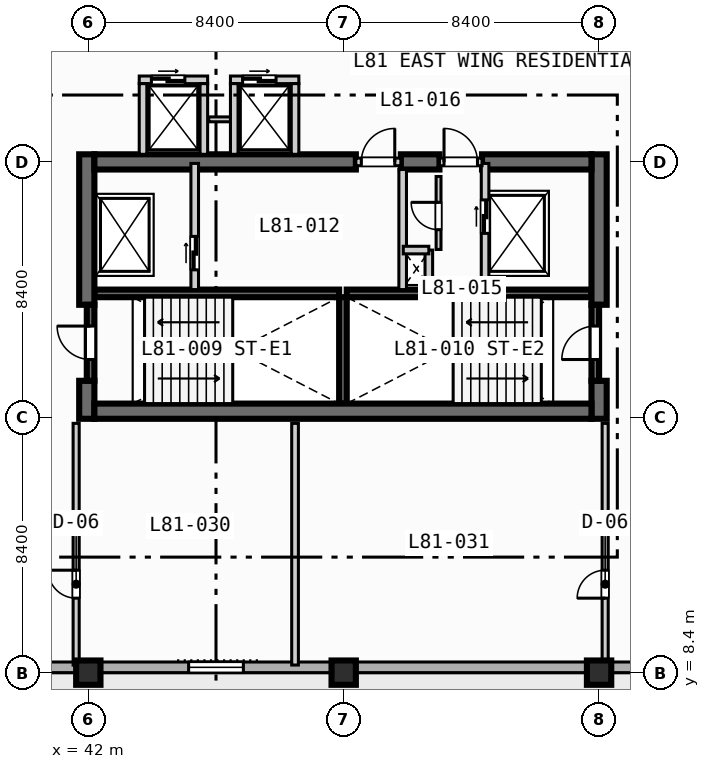
"""IFC4 building model, lengths in metres.
Left out: names, types, materials, properties, quantities, classifications, styles, units other than length and angle.
Written with IfcOpenShell. Run it as: python <this file> out.ifc"""

import sys

from ifc_helpers import new_model, si_unit, direction, frame, frame_2d, origin, origin_2d, place, context, subcontext, project, spatial, rectangle, extrude, element, fill, save


model = new_model("IFC4")
c1 = context("Model", 3, precision=1e-05, world=origin(), true_north=direction((0.0, 1.0)))
c2 = subcontext(c1, "Body", "Model", "MODEL_VIEW")
j1 = project(units=[si_unit("LENGTHUNIT", "METRE"), si_unit("PLANEANGLEUNIT", "RADIAN")], contexts=[c1])
p1 = place(None, origin())
s1 = spatial("IfcSite", under=j1, at=p1, CompositionType="ELEMENT")
p2 = place(p1, origin())
s2 = spatial("IfcBuilding", under=s1, at=p2, CompositionType="ELEMENT")
p3 = place(p2, frame((0.0, 0.0, 328.1)))
s3 = spatial("IfcBuildingStorey", under=s2, at=p3, CompositionType="ELEMENT", Elevation=328.1)
for number, where, z_axis, x_axis in (
    (1, (42.2, 20.875, 0.0), (0.0, 0.0, 1.0), (1.0, 0.0, 0.0)),
    (2, (50.5, 20.875, 0.0), (0.0, 0.0, 1.0), (1.0, 0.0, 0.0)),
):
    element("IfcWall", number, at=place(p3, frame(where, z_axis=z_axis, x_axis=x_axis)), inside=s3, PredefinedType="SOLIDWALL", context=c2, shape_type="SweptSolid", body=[
        extrude(rectangle(XDim=8.05, YDim=0.25, at=frame_2d((4.025, 0.0))), origin(), (0.0, 0.0, 1.0), 3.67),
    ])
p4 = place(p3, frame((50.375, 17.25, 0.0), z_axis=(0.0, 0.0, 1.0), x_axis=(0.0, 1.0, 0.0)))
e3 = element("IfcWall", 3, at=p4, inside=s3, PredefinedType="SOLIDWALL", context=c2, shape_type="SweptSolid", body=[
    extrude(rectangle(XDim=3.5, YDim=0.25, at=frame_2d((1.75, 0.0))), origin(), (0.0, 0.0, 1.0), 3.67),
])
p5 = place(p3, frame((41.95, 16.75, 0.0), z_axis=(0.0, 0.0, 1.0), x_axis=(0.0, 1.0, 0.0)))
e4 = element("IfcWall", 4, at=p5, inside=s3, PredefinedType="SHEAR", context=c2, shape_type="SweptSolid", body=[
    extrude(rectangle(XDim=1.25, YDim=0.5, at=frame_2d((0.625, 0.0))), origin(), (0.0, 0.0, 1.0), 3.67),
])
p6 = place(p3, frame((41.95, 20.5, 0.0), z_axis=(0.0, 0.0, 1.0), x_axis=(0.0, 1.0, 0.0)))
e5 = element("IfcWall", 5, at=p6, inside=s3, PredefinedType="SHEAR", context=c2, shape_type="SweptSolid", body=[
    extrude(rectangle(XDim=4.95, YDim=0.5, at=frame_2d((2.475, 0.0))), origin(), (0.0, 0.0, 1.0), 3.67),
])
p7 = place(p3, frame((58.8, 16.75, 0.0), z_axis=(0.0, 0.0, 1.0), x_axis=(0.0, 1.0, 0.0)))
e6 = element("IfcWall", 6, at=p7, inside=s3, PredefinedType="SHEAR", context=c2, shape_type="SweptSolid", body=[
    extrude(rectangle(XDim=1.25, YDim=0.5, at=frame_2d((0.625, 0.0))), origin(), (0.0, 0.0, 1.0), 3.67),
])
p8 = place(p3, frame((58.8, 20.5, 0.0), z_axis=(0.0, 0.0, 1.0), x_axis=(0.0, 1.0, 0.0)))
e7 = element("IfcWall", 7, at=p8, inside=s3, PredefinedType="SHEAR", context=c2, shape_type="SweptSolid", body=[
    extrude(rectangle(XDim=4.95, YDim=0.5, at=frame_2d((2.475, 0.0))), origin(), (0.0, 0.0, 1.0), 3.67),
])
p9 = place(p3, frame((42.2, 17.0, 0.0), z_axis=(0.0, 0.0, 1.0), x_axis=(1.0, 0.0, 0.0)))
e8 = element("IfcWall", 8, at=p9, inside=s3, PredefinedType="SHEAR", context=c2, shape_type="SweptSolid", body=[
    extrude(rectangle(XDim=16.35, YDim=0.5, at=frame_2d((8.175, 0.0))), origin(), (0.0, 0.0, 1.0), 3.67),
])
p10 = place(p3, frame((42.2, 25.2, 0.0), z_axis=(0.0, 0.0, 1.0), x_axis=(1.0, 0.0, 0.0)))
e9 = element("IfcWall", 9, at=p10, inside=s3, PredefinedType="SHEAR", context=c2, shape_type="SweptSolid", body=[
    extrude(rectangle(XDim=8.6, YDim=0.5, at=frame_2d((4.3, 0.0))), origin(), (0.0, 0.0, 1.0), 3.67),
])
p11 = place(p3, frame((52.28, 25.2, 0.0), z_axis=(0.0, 0.0, 1.0), x_axis=(1.0, 0.0, 0.0)))
e10 = element("IfcWall", 10, at=p11, inside=s3, PredefinedType="SHEAR", context=c2, shape_type="SweptSolid", body=[
    extrude(rectangle(XDim=1.27, YDim=0.5, at=frame_2d((0.635, 0.0))), origin(), (0.0, 0.0, 1.0), 3.67),
])
p12 = place(p3, frame((54.95, 25.2, 0.0), z_axis=(0.0, 0.0, 1.0), x_axis=(1.0, 0.0, 0.0)))
e11 = element("IfcWall", 11, at=p12, inside=s3, PredefinedType="SHEAR", context=c2, shape_type="SweptSolid", body=[
    extrude(rectangle(XDim=3.6, YDim=0.5, at=frame_2d((1.8, 0.0))), origin(), (0.0, 0.0, 1.0), 3.67),
])
for number, where, z_axis, x_axis in (
    (12, (42.0, 8.4, 0.0), (0.0, 0.0, 1.0), (1.0, 0.0, 0.0)),
    (13, (50.4, 8.4, 0.0), (0.0, 0.0, 1.0), (1.0, 0.0, 0.0)),
    (14, (58.8, 8.4, 0.0), (0.0, 0.0, 1.0), (1.0, 0.0, 0.0)),
):
    element("IfcColumn", number, at=place(p3, frame(where, z_axis=z_axis, x_axis=x_axis)), inside=s3, PredefinedType="COLUMN", context=c2, shape_type="SweptSolid", body=[
        extrude(rectangle(XDim=0.8, YDim=0.8, at=origin_2d()), origin(), (0.0, 0.0, 1.0), 3.9),
    ])
p13 = place(p3, frame((64.025, 8.575, 0.0), z_axis=(0.0, 0.0, 1.0), x_axis=(-1.0, 0.0, 0.0)))
e15 = element("IfcWall", 15, at=p13, inside=s3, PredefinedType="STANDARD", context=c2, shape_type="SweptSolid", body=[
    extrude(rectangle(XDim=52.45, YDim=0.35, at=frame_2d((26.225, 0.0))), origin(), (0.0, 0.0, 1.0), 3.67),
])
p14 = place(p13, frame((32.925, 0.0, 0.0)))
e16 = element("IfcOpeningElement", 16, at=p14, cuts=e15, PredefinedType="OPENING", context=c2, shape_type="SweptSolid", body=[
    extrude(rectangle(XDim=1.4, YDim=2.2, at=frame_2d((0.7, 1.1))), frame((0.0, 0.185, 0.0), z_axis=(0.0, -1.0, 0.0), x_axis=(1.0, 0.0, 0.0)), (0.0, 0.0, 1.0), 0.37),
])
p15 = place(p13, frame((41.825, 0.0, 0.85)))
e17 = element("IfcOpeningElement", 17, at=p15, cuts=e15, PredefinedType="OPENING", context=c2, shape_type="SweptSolid", body=[
    extrude(rectangle(XDim=2.4, YDim=1.95, at=frame_2d((1.2, 0.975))), frame((0.0, 0.185, 0.0), z_axis=(0.0, -1.0, 0.0), x_axis=(1.0, 0.0, 0.0)), (0.0, 0.0, 1.0), 0.37),
])
p16 = place(p13, frame((25.025, 0.0, 0.85)))
e18 = element("IfcOpeningElement", 18, at=p16, cuts=e15, PredefinedType="OPENING", context=c2, shape_type="SweptSolid", body=[
    extrude(rectangle(XDim=2.4, YDim=1.95, at=frame_2d((1.2, 0.975))), frame((0.0, 0.185, 0.0), z_axis=(0.0, -1.0, 0.0), x_axis=(1.0, 0.0, 0.0)), (0.0, 0.0, 1.0), 0.37),
])
p17 = place(p13, frame((16.925, 0.0, 0.85)))
e19 = element("IfcOpeningElement", 19, at=p17, cuts=e15, PredefinedType="OPENING", context=c2, shape_type="SweptSolid", body=[
    extrude(rectangle(XDim=1.8, YDim=1.8, at=frame_2d((0.9, 0.9))), frame((0.0, 0.185, 0.0), z_axis=(0.0, -1.0, 0.0), x_axis=(1.0, 0.0, 0.0)), (0.0, 0.0, 1.0), 0.37),
])
p18 = place(p13, frame((49.75, 0.0, 0.85)))
e20 = element("IfcOpeningElement", 20, at=p18, cuts=e15, PredefinedType="OPENING", context=c2, shape_type="SweptSolid", body=[
    extrude(rectangle(XDim=1.8, YDim=1.8, at=frame_2d((0.9, 0.9))), frame((0.0, 0.185, 0.0), z_axis=(0.0, -1.0, 0.0), x_axis=(1.0, 0.0, 0.0)), (0.0, 0.0, 1.0), 0.37),
])
p19 = place(p13, frame((47.89, 0.0, 0.85)))
e21 = element("IfcOpeningElement", 21, at=p19, cuts=e15, PredefinedType="OPENING", context=c2, shape_type="SweptSolid", body=[
    extrude(rectangle(XDim=0.72, YDim=1.8, at=frame_2d((0.36, 0.9))), frame((0.0, 0.185, 0.0), z_axis=(0.0, -1.0, 0.0), x_axis=(1.0, 0.0, 0.0)), (0.0, 0.0, 1.0), 0.37),
])
p20 = place(p13, frame((35.75, 0.0, 0.85)))
e22 = element("IfcOpeningElement", 22, at=p20, cuts=e15, PredefinedType="OPENING", context=c2, shape_type="SweptSolid", body=[
    extrude(rectangle(XDim=1.8, YDim=1.8, at=frame_2d((0.9, 0.9))), frame((0.0, 0.185, 0.0), z_axis=(0.0, -1.0, 0.0), x_axis=(1.0, 0.0, 0.0)), (0.0, 0.0, 1.0), 0.37),
])
p21 = place(p3, frame((42.075, 18.0, 0.0), z_axis=(0.0, 0.0, 1.0), x_axis=(0.0, 1.0, 0.0)))
e23 = element("IfcWall", 23, at=p21, inside=s3, PredefinedType="SOLIDWALL", context=c2, shape_type="SweptSolid", body=[
    extrude(rectangle(XDim=2.5, YDim=0.25, at=frame_2d((1.25, 0.0))), origin(), (0.0, 0.0, 1.0), 3.67),
])
p22 = place(p21, frame((0.7, 0.0, 0.0)))
e24 = element("IfcOpeningElement", 24, at=p22, cuts=e23, PredefinedType="OPENING", context=c2, shape_type="SweptSolid", body=[
    extrude(rectangle(XDim=1.1, YDim=2.15, at=frame_2d((0.55, 1.075))), frame((0.0, 0.135, 0.0), z_axis=(0.0, -1.0, 0.0), x_axis=(1.0, 0.0, 0.0)), (0.0, 0.0, 1.0), 0.27),
])
p23 = place(p3, frame((58.675, 18.0, 0.0), z_axis=(0.0, 0.0, 1.0), x_axis=(0.0, 1.0, 0.0)))
e25 = element("IfcWall", 25, at=p23, inside=s3, PredefinedType="SOLIDWALL", context=c2, shape_type="SweptSolid", body=[
    extrude(rectangle(XDim=2.5, YDim=0.25, at=frame_2d((1.25, 0.0))), origin(), (0.0, 0.0, 1.0), 3.67),
])
p24 = place(p23, frame((0.7, 0.0, 0.0)))
e26 = element("IfcOpeningElement", 26, at=p24, cuts=e25, PredefinedType="OPENING", context=c2, shape_type="SweptSolid", body=[
    extrude(rectangle(XDim=1.1, YDim=2.15, at=frame_2d((0.55, 1.075))), frame((0.0, 0.135, 0.0), z_axis=(0.0, -1.0, 0.0), x_axis=(1.0, 0.0, 0.0)), (0.0, 0.0, 1.0), 0.27),
])
p25 = place(p3, frame((45.5, 21.0, 0.0), z_axis=(0.0, 0.0, 1.0), x_axis=(0.0, 1.0, 0.0)))
e27 = element("IfcWall", 27, at=p25, inside=s3, PredefinedType="SOLIDWALL", context=c2, shape_type="SweptSolid", body=[
    extrude(rectangle(XDim=4.15, YDim=0.25, at=frame_2d((2.075, 0.0))), origin(), (0.0, 0.0, 1.0), 3.67),
])
p26 = place(p25, frame((0.65, 0.0, 0.0)))
e28 = element("IfcOpeningElement", 28, at=p26, cuts=e27, PredefinedType="OPENING", context=c2, shape_type="SweptSolid", body=[
    extrude(rectangle(XDim=1.1, YDim=2.15, at=frame_2d((0.55, 1.075))), frame((0.0, 0.135, 0.0), z_axis=(0.0, -1.0, 0.0), x_axis=(1.0, 0.0, 0.0)), (0.0, 0.0, 1.0), 0.27),
])
p27 = place(p3, frame((50.8, 25.2, 0.0), z_axis=(0.0, 0.0, 1.0), x_axis=(1.0, 0.0, 0.0)))
e29 = element("IfcWall", 29, at=p27, inside=s3, PredefinedType="SOLIDWALL", context=c2, shape_type="SweptSolid", body=[
    extrude(rectangle(XDim=1.48, YDim=0.25, at=frame_2d((0.74, 0.0))), origin(), (0.0, 0.0, 1.0), 3.67),
])
p28 = place(p27, frame((0.18, 0.0, 0.0)))
e30 = element("IfcOpeningElement", 30, at=p28, cuts=e29, PredefinedType="OPENING", context=c2, shape_type="SweptSolid", body=[
    extrude(rectangle(XDim=1.1, YDim=2.15, at=frame_2d((0.55, 1.075))), frame((0.0, 0.135, 0.0), z_axis=(0.0, -1.0, 0.0), x_axis=(1.0, 0.0, 0.0)), (0.0, 0.0, 1.0), 0.27),
])
p29 = place(p3, frame((52.34, 21.0, 0.0), z_axis=(0.0, 0.0, 1.0), x_axis=(0.0, 1.0, 0.0)))
e31 = element("IfcWall", 31, at=p29, inside=s3, PredefinedType="SOLIDWALL", context=c2, shape_type="SweptSolid", body=[
    extrude(rectangle(XDim=3.95, YDim=0.25, at=frame_2d((1.975, 0.0))), origin(), (0.0, 0.0, 1.0), 3.67),
])
p30 = place(p3, frame((55.05, 21.0, 0.0), z_axis=(0.0, 0.0, 1.0), x_axis=(0.0, 1.0, 0.0)))
e32 = element("IfcWall", 32, at=p30, inside=s3, PredefinedType="SOLIDWALL", context=c2, shape_type="SweptSolid", body=[
    extrude(rectangle(XDim=4.15, YDim=0.25, at=frame_2d((2.075, 0.0))), origin(), (0.0, 0.0, 1.0), 3.67),
])
p31 = place(p30, frame((1.85, 0.0, 0.0)))
e33 = element("IfcOpeningElement", 33, at=p31, cuts=e32, PredefinedType="OPENING", context=c2, shape_type="SweptSolid", body=[
    extrude(rectangle(XDim=1.1, YDim=2.15, at=frame_2d((0.55, 1.075))), frame((0.0, 0.135, 0.0), z_axis=(0.0, -1.0, 0.0), x_axis=(1.0, 0.0, 0.0)), (0.0, 0.0, 1.0), 0.27),
])
p32 = place(p3, frame((53.55, 25.2, 0.0), z_axis=(0.0, 0.0, 1.0), x_axis=(1.0, 0.0, 0.0)))
e34 = element("IfcWall", 34, at=p32, inside=s3, PredefinedType="SOLIDWALL", context=c2, shape_type="SweptSolid", body=[
    extrude(rectangle(XDim=1.4, YDim=0.25, at=frame_2d((0.7, 0.0))), origin(), (0.0, 0.0, 1.0), 3.67),
])
p33 = place(p32, frame((0.15, 0.0, 0.0)))
e35 = element("IfcOpeningElement", 35, at=p33, cuts=e34, PredefinedType="OPENING", context=c2, shape_type="SweptSolid", body=[
    extrude(rectangle(XDim=1.1, YDim=2.15, at=frame_2d((0.55, 1.075))), frame((0.0, 0.135, 0.0), z_axis=(0.0, -1.0, 0.0), x_axis=(1.0, 0.0, 0.0)), (0.0, 0.0, 1.0), 0.27),
])
p34 = place(p3, frame((53.2, 21.0, 0.0), z_axis=(0.0, 0.0, 1.0), x_axis=(0.0, 1.0, 0.0)))
e36 = element("IfcWall", 36, at=p34, inside=s3, PredefinedType="SOLIDWALL", context=c2, shape_type="SweptSolid", body=[
    extrude(rectangle(XDim=1.3, YDim=0.25, at=frame_2d((0.65, 0.0))), origin(), (0.0, 0.0, 1.0), 3.67),
])
p35 = place(p3, frame((52.36, 22.3, 0.0), z_axis=(0.0, 0.0, 1.0), x_axis=(1.0, 0.0, 0.0)))
e37 = element("IfcWall", 37, at=p35, inside=s3, PredefinedType="SOLIDWALL", context=c2, shape_type="SweptSolid", body=[
    extrude(rectangle(XDim=0.84, YDim=0.25, at=frame_2d((0.42, 0.0))), origin(), (0.0, 0.0, 1.0), 3.67),
])
p36 = place(p3, frame((53.52, 22.32, 0.0), z_axis=(0.0, 0.0, 1.0), x_axis=(0.0, 1.0, 0.0)))
e38 = element("IfcWall", 38, at=p36, inside=s3, PredefinedType="PARTITIONING", context=c2, shape_type="SweptSolid", body=[
    extrude(rectangle(XDim=2.4, YDim=0.16, at=frame_2d((1.2, 0.0))), origin(), (0.0, 0.0, 1.0), 3.67),
])
p37 = place(p36, frame((0.65, 0.0, 0.0)))
e39 = element("IfcOpeningElement", 39, at=p37, cuts=e38, PredefinedType="OPENING", context=c2, shape_type="SweptSolid", body=[
    extrude(rectangle(XDim=0.9, YDim=2.1, at=frame_2d((0.45, 1.05))), frame((0.0, 0.09, 0.0), z_axis=(0.0, -1.0, 0.0), x_axis=(1.0, 0.0, 0.0)), (0.0, 0.0, 1.0), 0.18),
])
p38 = place(p3, frame((43.675, 27.9, 0.0), z_axis=(0.0, 0.0, 1.0), x_axis=(1.0, 0.0, 0.0)))
e40 = element("IfcWall", 40, at=p38, inside=s3, PredefinedType="SOLIDWALL", context=c2, shape_type="SweptSolid", body=[
    extrude(rectangle(XDim=2.25, YDim=0.25, at=frame_2d((1.125, 0.0))), origin(), (0.0, 0.0, 1.0), 3.67),
])
p39 = place(p38, frame((0.4, 0.0, 0.0)))
e41 = element("IfcOpeningElement", 41, at=p39, cuts=e40, PredefinedType="OPENING", context=c2, shape_type="SweptSolid", body=[
    extrude(rectangle(XDim=1.1, YDim=2.15, at=frame_2d((0.55, 1.075))), frame((0.0, 0.135, 0.0), z_axis=(0.0, -1.0, 0.0), x_axis=(1.0, 0.0, 0.0)), (0.0, 0.0, 1.0), 0.27),
])
for number, where, z_axis, x_axis in (
    (42, (43.8, 25.45, 0.0), (0.0, 0.0, 1.0), (0.0, 1.0, 0.0)),
    (43, (45.8, 25.45, 0.0), (0.0, 0.0, 1.0), (0.0, 1.0, 0.0)),
):
    element("IfcWall", number, at=place(p3, frame(where, z_axis=z_axis, x_axis=x_axis)), inside=s3, PredefinedType="SOLIDWALL", context=c2, shape_type="SweptSolid", body=[
        extrude(rectangle(XDim=2.325, YDim=0.25, at=frame_2d((1.163, 0.0))), origin(), (0.0, 0.0, 1.0), 3.67),
    ])
p40 = place(p3, frame((45.96, 26.6, 0.0), z_axis=(0.0, 0.0, 1.0), x_axis=(1.0, 0.0, 0.0)))
e44 = element("IfcWall", 44, at=p40, inside=s3, PredefinedType="PARTITIONING", context=c2, shape_type="SweptSolid", body=[
    extrude(rectangle(XDim=0.88, YDim=0.16, at=frame_2d((0.44, 0.0))), origin(), (0.0, 0.0, 1.0), 3.67),
])
p41 = place(p3, frame((46.675, 27.9, 0.0), z_axis=(0.0, 0.0, 1.0), x_axis=(1.0, 0.0, 0.0)))
e45 = element("IfcWall", 45, at=p41, inside=s3, PredefinedType="SOLIDWALL", context=c2, shape_type="SweptSolid", body=[
    extrude(rectangle(XDim=2.25, YDim=0.25, at=frame_2d((1.125, 0.0))), origin(), (0.0, 0.0, 1.0), 3.67),
])
p42 = place(p41, frame((0.4, 0.0, 0.0)))
e46 = element("IfcOpeningElement", 46, at=p42, cuts=e45, PredefinedType="OPENING", context=c2, shape_type="SweptSolid", body=[
    extrude(rectangle(XDim=1.1, YDim=2.15, at=frame_2d((0.55, 1.075))), frame((0.0, 0.135, 0.0), z_axis=(0.0, -1.0, 0.0), x_axis=(1.0, 0.0, 0.0)), (0.0, 0.0, 1.0), 0.27),
])
for number, where, z_axis, x_axis in (
    (47, (46.8, 25.45, 0.0), (0.0, 0.0, 1.0), (0.0, 1.0, 0.0)),
    (48, (48.8, 25.45, 0.0), (0.0, 0.0, 1.0), (0.0, 1.0, 0.0)),
):
    element("IfcWall", number, at=place(p3, frame(where, z_axis=z_axis, x_axis=x_axis)), inside=s3, PredefinedType="SOLIDWALL", context=c2, shape_type="SweptSolid", body=[
        extrude(rectangle(XDim=2.325, YDim=0.25, at=frame_2d((1.163, 0.0))), origin(), (0.0, 0.0, 1.0), 3.67),
    ])
p43 = place(p3, frame((41.6, 8.65, 0.0), z_axis=(0.0, 0.0, 1.0), x_axis=(0.0, 1.0, 0.0)))
e49 = element("IfcWall", 49, at=p43, inside=s3, PredefinedType="PARTITIONING", context=c2, shape_type="SweptSolid", body=[
    extrude(rectangle(XDim=7.95, YDim=0.2, at=frame_2d((3.975, 0.0))), origin(), (0.0, 0.0, 1.0), 3.67),
])
p44 = place(p43, frame((2.2, 0.0, 0.0)))
e50 = element("IfcOpeningElement", 50, at=p44, cuts=e49, PredefinedType="OPENING", context=c2, shape_type="SweptSolid", body=[
    extrude(rectangle(XDim=0.92, YDim=2.1, at=frame_2d((0.46, 1.05))), frame((0.0, 0.11, 0.0), z_axis=(0.0, -1.0, 0.0), x_axis=(1.0, 0.0, 0.0)), (0.0, 0.0, 1.0), 0.22),
])
p45 = place(p3, frame((59.0, 8.65, 0.0), z_axis=(0.0, 0.0, 1.0), x_axis=(0.0, 1.0, 0.0)))
e51 = element("IfcWall", 51, at=p45, inside=s3, PredefinedType="PARTITIONING", context=c2, shape_type="SweptSolid", body=[
    extrude(rectangle(XDim=7.95, YDim=0.2, at=frame_2d((3.975, 0.0))), origin(), (0.0, 0.0, 1.0), 3.07),
])
p46 = place(p45, frame((2.2, 0.0, 0.0)))
e52 = element("IfcOpeningElement", 52, at=p46, cuts=e51, PredefinedType="OPENING", context=c2, shape_type="SweptSolid", body=[
    extrude(rectangle(XDim=0.92, YDim=2.1, at=frame_2d((0.46, 1.05))), frame((0.0, 0.11, 0.0), z_axis=(0.0, -1.0, 0.0), x_axis=(1.0, 0.0, 0.0)), (0.0, 0.0, 1.0), 0.22),
])
p47 = place(p3, frame((48.8, 8.65, 0.0), z_axis=(0.0, 0.0, 1.0), x_axis=(0.0, 1.0, 0.0)))
e53 = element("IfcWall", 53, at=p47, inside=s3, PredefinedType="PARTITIONING", context=c2, shape_type="SweptSolid", body=[
    extrude(rectangle(XDim=7.95, YDim=0.22, at=frame_2d((3.975, 0.0))), origin(), (0.0, 0.0, 1.0), 3.67),
])
p48 = place(p17, origin())
e54 = element("IfcWindow", 54, at=p48, inside=s3, PartitioningType="SINGLE_PANEL", PredefinedType="WINDOW", context=c2, shape_type="SweptSolid", body=[
    extrude(rectangle(XDim=1.8, YDim=1.8, at=frame_2d((0.9, 0.9))), frame((0.0, 0.03, 0.0), z_axis=(0.0, -1.0, 0.0), x_axis=(1.0, 0.0, 0.0)), (0.0, 0.0, 1.0), 0.06),
])
fill(e19, e54)
p49 = place(p22, origin())
e55 = element("IfcDoor", 55, at=p49, inside=s3, OperationType="SINGLE_SWING_RIGHT", PredefinedType="DOOR", context=c2, shape_type="SweptSolid", body=[
    extrude(rectangle(XDim=1.1, YDim=2.15, at=frame_2d((0.55, 1.075))), frame((0.0, 0.025, 0.0), z_axis=(0.0, -1.0, 0.0), x_axis=(1.0, 0.0, 0.0)), (0.0, 0.0, 1.0), 0.05),
])
fill(e24, e55)
p50 = place(p24, origin())
e56 = element("IfcDoor", 56, at=p50, inside=s3, OperationType="SINGLE_SWING_LEFT", PredefinedType="DOOR", context=c2, shape_type="SweptSolid", body=[
    extrude(rectangle(XDim=1.1, YDim=2.15, at=frame_2d((0.55, 1.075))), frame((0.0, 0.025, 0.0), z_axis=(0.0, -1.0, 0.0), x_axis=(1.0, 0.0, 0.0)), (0.0, 0.0, 1.0), 0.05),
])
fill(e26, e56)
p51 = place(p26, origin())
e57 = element("IfcDoor", 57, at=p51, inside=s3, OperationType="SLIDING_TO_LEFT", PredefinedType="DOOR", context=c2, shape_type="SweptSolid", body=[
    extrude(rectangle(XDim=1.1, YDim=2.15, at=frame_2d((0.55, 1.075))), frame((0.0, 0.025, 0.0), z_axis=(0.0, -1.0, 0.0), x_axis=(1.0, 0.0, 0.0)), (0.0, 0.0, 1.0), 0.05),
])
fill(e28, e57)
p52 = place(p28, origin())
e58 = element("IfcDoor", 58, at=p52, inside=s3, OperationType="SINGLE_SWING_RIGHT", PredefinedType="DOOR", context=c2, shape_type="SweptSolid", body=[
    extrude(rectangle(XDim=1.1, YDim=2.15, at=frame_2d((0.55, 1.075))), frame((0.0, 0.025, 0.0), z_axis=(0.0, -1.0, 0.0), x_axis=(1.0, 0.0, 0.0)), (0.0, 0.0, 1.0), 0.05),
])
fill(e30, e58)
p53 = place(p31, origin())
e59 = element("IfcDoor", 59, at=p53, inside=s3, OperationType="SLIDING_TO_LEFT", PredefinedType="DOOR", context=c2, shape_type="SweptSolid", body=[
    extrude(rectangle(XDim=1.1, YDim=2.15, at=frame_2d((0.55, 1.075))), frame((0.0, 0.025, 0.0), z_axis=(0.0, -1.0, 0.0), x_axis=(1.0, 0.0, 0.0)), (0.0, 0.0, 1.0), 0.05),
])
fill(e33, e59)
p54 = place(p33, origin())
e60 = element("IfcDoor", 60, at=p54, inside=s3, OperationType="SINGLE_SWING_LEFT", PredefinedType="DOOR", context=c2, shape_type="SweptSolid", body=[
    extrude(rectangle(XDim=1.1, YDim=2.15, at=frame_2d((0.55, 1.075))), frame((0.0, 0.025, 0.0), z_axis=(0.0, -1.0, 0.0), x_axis=(1.0, 0.0, 0.0)), (0.0, 0.0, 1.0), 0.05),
])
fill(e35, e60)
p55 = place(p37, origin())
e61 = element("IfcDoor", 61, at=p55, inside=s3, OperationType="SINGLE_SWING_RIGHT", PredefinedType="DOOR", context=c2, shape_type="SweptSolid", body=[
    extrude(rectangle(XDim=0.9, YDim=2.1, at=frame_2d((0.45, 1.05))), frame((0.0, 0.025, 0.0), z_axis=(0.0, -1.0, 0.0), x_axis=(1.0, 0.0, 0.0)), (0.0, 0.0, 1.0), 0.05),
])
fill(e39, e61)
p56 = place(p39, origin())
e62 = element("IfcDoor", 62, at=p56, inside=s3, OperationType="SLIDING_TO_LEFT", PredefinedType="DOOR", context=c2, shape_type="SweptSolid", body=[
    extrude(rectangle(XDim=1.1, YDim=2.15, at=frame_2d((0.55, 1.075))), frame((0.0, 0.025, 0.0), z_axis=(0.0, -1.0, 0.0), x_axis=(1.0, 0.0, 0.0)), (0.0, 0.0, 1.0), 0.05),
])
fill(e41, e62)
p57 = place(p42, origin())
e63 = element("IfcDoor", 63, at=p57, inside=s3, OperationType="SLIDING_TO_LEFT", PredefinedType="DOOR", context=c2, shape_type="SweptSolid", body=[
    extrude(rectangle(XDim=1.1, YDim=2.15, at=frame_2d((0.55, 1.075))), frame((0.0, 0.025, 0.0), z_axis=(0.0, -1.0, 0.0), x_axis=(1.0, 0.0, 0.0)), (0.0, 0.0, 1.0), 0.05),
])
fill(e46, e63)
p58 = place(p44, origin())
e64 = element("IfcDoor", 64, at=p58, inside=s3, OperationType="SINGLE_SWING_RIGHT", PredefinedType="DOOR", context=c2, shape_type="SweptSolid", body=[
    extrude(rectangle(XDim=0.92, YDim=2.1, at=frame_2d((0.46, 1.05))), frame((0.0, 0.025, 0.0), z_axis=(0.0, -1.0, 0.0), x_axis=(1.0, 0.0, 0.0)), (0.0, 0.0, 1.0), 0.05),
])
fill(e50, e64)
p59 = place(p46, origin())
e65 = element("IfcDoor", 65, at=p59, inside=s3, OperationType="SINGLE_SWING_LEFT", PredefinedType="DOOR", context=c2, shape_type="SweptSolid", body=[
    extrude(rectangle(XDim=0.92, YDim=2.1, at=frame_2d((0.46, 1.05))), frame((0.0, 0.025, 0.0), z_axis=(0.0, -1.0, 0.0), x_axis=(1.0, 0.0, 0.0)), (0.0, 0.0, 1.0), 0.05),
])
fill(e52, e65)
save(model, sys.argv[1])
